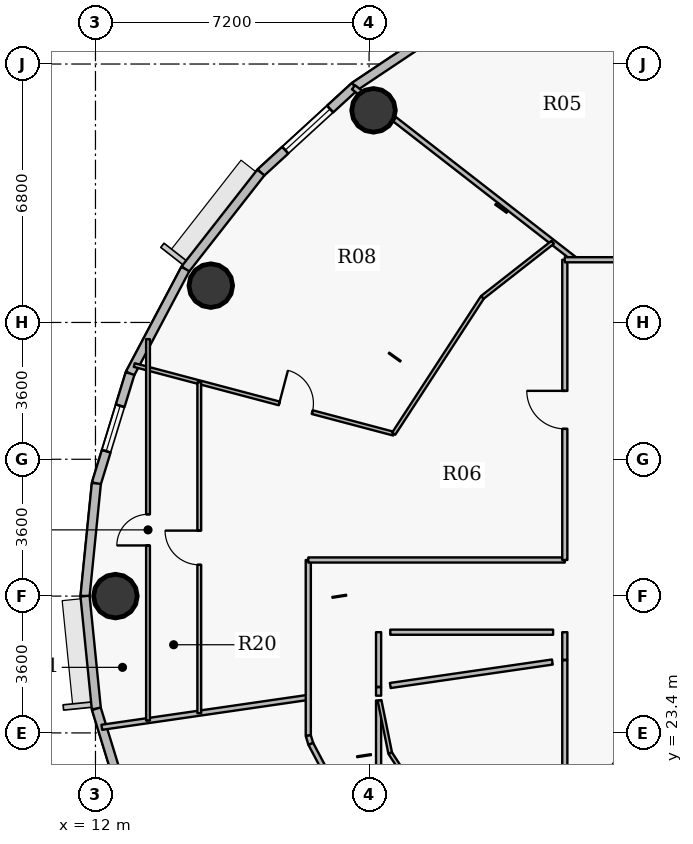
"""IFC4 building model, lengths in metres.
Left out: names, types, materials, properties, quantities, classifications, styles, units other than length and angle.
Written with IfcOpenShell. Run it as: python <this file> out.ifc"""

import sys

from ifc_helpers import new_model, si_unit, direction, frame, frame_2d, origin, origin_2d, place, context, subcontext, project, spatial, rectangle, hollow_circle, extrude, source, transform, mapped, element, fill, save


model = new_model("IFC4")
c1 = context("Model", 3, precision=1e-05, world=origin(), true_north=direction((0.0, 1.0)))
c2 = subcontext(c1, "Body", "Model", "MODEL_VIEW")
j1 = project(units=[si_unit("LENGTHUNIT", "METRE"), si_unit("PLANEANGLEUNIT", "RADIAN")], contexts=[c1])
p1 = place(None, origin())
s1 = spatial("IfcSite", under=j1, at=p1, CompositionType="ELEMENT")
p2 = place(p1, origin())
s2 = spatial("IfcBuilding", under=s1, at=p2, CompositionType="ELEMENT")
p3 = place(p2, frame((0.0, 0.0, 232.8)))
s3 = spatial("IfcBuildingStorey", under=s2, at=p3, CompositionType="ELEMENT", Elevation=232.8)
for number, where, z_axis, x_axis in (
    (1, (19.317, 39.781, 0.0), (0.0, 0.0, 1.0), (1.0, 0.0, 0.0)),
    (2, (15.035, 35.169, 0.0), (0.0, 0.0, 1.0), (1.0, 0.0, 0.0)),
    (3, (12.525, 27.0, 0.0), (0.0, 0.0, 1.0), (1.0, 0.0, 0.0)),
):
    element("IfcColumn", number, at=place(p3, frame(where, z_axis=z_axis, x_axis=x_axis)), inside=s3, PredefinedType="COLUMN", context=c2, shape_type="SweptSolid", body=[
        extrude(hollow_circle(Radius=0.575, WallThickness=0.036, at=origin_2d()), origin(), (0.0, 0.0, 1.0), 3.75),
    ])
p4 = place(p3, frame((18.824, 40.411, 0.0), z_axis=(0.0, 0.0, 1.0), x_axis=(0.831262496074, 0.555880079352, 0.0)))
e4 = element("IfcWall", 4, at=p4, inside=s3, PredefinedType="SOLIDWALL", context=c2, shape_type="SweptSolid", body=[
    extrude(rectangle(XDim=3.484, YDim=0.24, at=frame_2d((1.742, 0.0))), origin(), (0.0, 0.0, 1.0), 3.5),
])
p5 = place(p3, frame((16.352, 38.145, 0.0), z_axis=(0.0, 0.0, 1.0), x_axis=(0.737123922599, 0.675757591694, 0.0)))
e5 = element("IfcWall", 5, at=p5, inside=s3, PredefinedType="SOLIDWALL", context=c2, shape_type="SweptSolid", body=[
    extrude(rectangle(XDim=3.354, YDim=0.24, at=frame_2d((1.677, 0.0))), origin(), (0.0, 0.0, 1.0), 3.5),
])
p6 = place(p5, frame((0.873, 0.0, 0.9)))
e6 = element("IfcOpeningElement", 6, at=p6, cuts=e5, PredefinedType="OPENING", context=c2, shape_type="SweptSolid", body=[
    extrude(rectangle(XDim=1.6, YDim=1.75, at=origin_2d()), frame((0.8, 0.13, 0.875), z_axis=(0.0, -1.0, 0.0), x_axis=(1.0, 0.0, 0.0)), (0.0, 0.0, 1.0), 0.26),
])
p7 = place(p3, frame((14.364, 35.605, 0.0), z_axis=(0.0, 0.0, 1.0), x_axis=(0.616312344705, 0.787501805562, 0.0)))
e7 = element("IfcWall", 7, at=p7, inside=s3, PredefinedType="SOLIDWALL", context=c2, shape_type="SweptSolid", body=[
    extrude(rectangle(XDim=3.225, YDim=0.24, at=frame_2d((1.612, 0.0))), origin(), (0.0, 0.0, 1.0), 3.5),
])
p8 = place(p3, frame((12.91, 32.856, 0.0), z_axis=(0.0, 0.0, 1.0), x_axis=(0.46766049993, 0.883908172157, 0.0)))
e8 = element("IfcWall", 8, at=p8, inside=s3, PredefinedType="SOLIDWALL", context=c2, shape_type="SweptSolid", body=[
    extrude(rectangle(XDim=3.11, YDim=0.24, at=frame_2d((1.555, 0.0))), origin(), (0.0, 0.0, 1.0), 3.5),
])
p9 = place(p3, frame((12.023, 29.964, 0.0), z_axis=(0.0, 0.0, 1.0), x_axis=(0.293132907334, 0.95607170162, 0.0)))
e9 = element("IfcWall", 9, at=p9, inside=s3, PredefinedType="SOLIDWALL", context=c2, shape_type="SweptSolid", body=[
    extrude(rectangle(XDim=3.025, YDim=0.24, at=frame_2d((1.512, 0.0))), origin(), (0.0, 0.0, 1.0), 3.5),
])
p10 = place(p9, frame((0.887, 0.0, 0.9)))
e10 = element("IfcOpeningElement", 10, at=p10, cuts=e9, PredefinedType="OPENING", context=c2, shape_type="SweptSolid", body=[
    extrude(rectangle(XDim=1.25, YDim=1.65, at=origin_2d()), frame((0.625, 0.13, 0.825), z_axis=(0.0, -1.0, 0.0), x_axis=(1.0, 0.0, 0.0)), (0.0, 0.0, 1.0), 0.26),
])
for number, where, z_axis, x_axis in (
    (11, (11.725, 27.0, 0.0), (0.0, 0.0, 1.0), (0.1, 0.995, 0.0)),
    (12, (12.023, 24.036, 0.0), (0.0, 0.0, 1.0), (-0.1, 0.995, 0.0)),
):
    element("IfcWall", number, at=place(p3, frame(where, z_axis=z_axis, x_axis=x_axis)), inside=s3, PredefinedType="SOLIDWALL", context=c2, shape_type="SweptSolid", body=[
        extrude(rectangle(XDim=2.979, YDim=0.24, at=frame_2d((1.489, 0.0))), origin(), (0.0, 0.0, 1.0), 3.5),
    ])
p11 = place(p3, frame((12.91, 21.144, 0.0), z_axis=(0.0, 0.0, 1.0), x_axis=(-0.293132907334, 0.95607170162, 0.0)))
e13 = element("IfcWall", 13, at=p11, inside=s3, PredefinedType="SOLIDWALL", context=c2, shape_type="SweptSolid", body=[
    extrude(rectangle(XDim=3.025, YDim=0.24, at=frame_2d((1.512, 0.0))), origin(), (0.0, 0.0, 1.0), 3.5),
])
p12 = place(p3, frame((12.167, 23.548, 0.0), z_axis=(0.0, 0.0, 1.0), x_axis=(0.989672764262, 0.143345106921, 0.0)))
e14 = element("IfcWall", 14, at=p12, inside=s3, PredefinedType="PARTITIONING", context=c2, shape_type="SweptSolid", body=[
    extrude(rectangle(XDim=5.489, YDim=0.135, at=frame_2d((2.745, 0.0))), origin(), (0.0, 0.0, 1.0), 2.985),
])
p13 = place(p3, frame((13.022, 33.079, 0.0), z_axis=(0.0, 0.0, 1.0), x_axis=(0.966904841433, -0.255137272097, 0.0)))
e15 = element("IfcWall", 15, at=p13, inside=s3, PredefinedType="PARTITIONING", context=c2, shape_type="SweptSolid", body=[
    extrude(rectangle(XDim=0.373, YDim=0.1, at=frame_2d((0.187, 0.0))), origin(), (0.0, 0.0, 1.0), 3.5),
])
p14 = place(p3, frame((13.392, 32.981, 0.0), z_axis=(0.0, 0.0, 1.0), x_axis=(0.966739802164, -0.255761910595, 0.0)))
e16 = element("IfcWall", 16, at=p14, inside=s3, PredefinedType="PARTITIONING", context=c2, shape_type="SweptSolid", body=[
    extrude(rectangle(XDim=6.677, YDim=0.1, at=frame_2d((3.339, 0.0))), origin(), (0.0, 0.0, 1.0), 2.985),
])
p15 = place(p14, frame((3.561, 0.0, 0.0)))
e17 = element("IfcOpeningElement", 17, at=p15, cuts=e16, PredefinedType="OPENING", context=c2, shape_type="SweptSolid", body=[
    extrude(rectangle(XDim=0.9, YDim=2.1, at=origin_2d()), frame((0.45, 0.06, 1.05), z_axis=(0.0, -1.0, 0.0), x_axis=(1.0, 0.0, 0.0)), (0.0, 0.0, 1.0), 0.12),
])
p16 = place(p3, frame((13.383, 23.724, 0.0), z_axis=(0.0, 0.0, 1.0), x_axis=(0.0, 1.0, 0.0)))
e18 = element("IfcWall", 18, at=p16, inside=s3, PredefinedType="PARTITIONING", context=c2, shape_type="SweptSolid", body=[
    extrude(rectangle(XDim=10.037, YDim=0.1, at=frame_2d((5.019, 0.0))), origin(), (0.0, 0.0, 1.0), 2.935),
])
p17 = place(p16, frame((4.608, 0.0, 0.0)))
e19 = element("IfcOpeningElement", 19, at=p17, cuts=e18, PredefinedType="OPENING", context=c2, shape_type="SweptSolid", body=[
    extrude(rectangle(XDim=0.82, YDim=2.1, at=origin_2d()), frame((0.41, 0.06, 1.05), z_axis=(0.0, -1.0, 0.0), x_axis=(1.0, 0.0, 0.0)), (0.0, 0.0, 1.0), 0.12),
])
p18 = place(p3, frame((14.732, 23.919, 0.0), z_axis=(0.0, 0.0, 1.0), x_axis=(0.0, 1.0, 0.0)))
e20 = element("IfcWall", 20, at=p18, inside=s3, PredefinedType="PARTITIONING", context=c2, shape_type="SweptSolid", body=[
    extrude(rectangle(XDim=8.708, YDim=0.1, at=frame_2d((4.354, 0.0))), origin(), (0.0, 0.0, 1.0), 2.935),
])
p19 = place(p18, frame((3.904, 0.0, 0.0)))
e21 = element("IfcOpeningElement", 21, at=p19, cuts=e20, PredefinedType="OPENING", context=c2, shape_type="SweptSolid", body=[
    extrude(rectangle(XDim=0.9, YDim=2.1, at=origin_2d()), frame((0.45, 0.06, 1.05), z_axis=(0.0, -1.0, 0.0), x_axis=(1.0, 0.0, 0.0)), (0.0, 0.0, 1.0), 0.12),
])
p20 = place(p3, frame((17.6, 23.328, 0.0), z_axis=(0.0, 0.0, 1.0), x_axis=(0.0, 1.0, 0.0)))
e22 = element("IfcWall", 22, at=p20, inside=s3, PredefinedType="PARTITIONING", context=c2, shape_type="SweptSolid", body=[
    extrude(rectangle(XDim=4.622, YDim=0.135, at=frame_2d((2.311, 0.0))), origin(), (0.0, 0.0, 1.0), 2.935),
])
p21 = place(p3, frame((17.6, 23.328, 0.0), z_axis=(0.0, 0.0, 1.0), x_axis=(0.292875000845, -0.956150738053, 0.0)))
e23 = element("IfcWall", 23, at=p21, inside=s3, PredefinedType="PARTITIONING", context=c2, shape_type="SweptSolid", body=[
    extrude(rectangle(XDim=0.227, YDim=0.135, at=frame_2d((0.113, 0.0))), origin(), (0.0, 0.0, 1.0), 3.5),
])
p22 = place(p3, frame((17.6, 27.95, 0.0), z_axis=(0.0, 0.0, 1.0), x_axis=(1.0, 0.0, 0.0)))
e24 = element("IfcWall", 24, at=p22, inside=s3, PredefinedType="PARTITIONING", context=c2, shape_type="SweptSolid", body=[
    extrude(rectangle(XDim=6.75, YDim=0.135, at=frame_2d((3.375, 0.0))), origin(), (0.0, 0.0, 1.0), 3.5),
])
p23 = place(p3, frame((17.667, 23.111, 0.0), z_axis=(0.0, 0.0, 1.0), x_axis=(0.467675622269, -0.883900171024, 0.0)))
e25 = element("IfcWall", 25, at=p23, inside=s3, PredefinedType="PARTITIONING", context=c2, shape_type="SweptSolid", body=[
    extrude(rectangle(XDim=2.168, YDim=0.135, at=frame_2d((1.084, 0.0))), origin(), (0.0, 0.0, 1.0), 2.935),
])
p24 = place(p3, frame((18.791, 40.387, 0.0), z_axis=(0.0, 0.0, 1.0), x_axis=(0.789302404173, -0.614004653701, 0.0)))
e26 = element("IfcWall", 26, at=p24, inside=s3, PredefinedType="PARTITIONING", context=c2, shape_type="SweptSolid", body=[
    extrude(rectangle(XDim=7.39, YDim=0.135, at=frame_2d((3.695, 0.0))), origin(), (0.0, 0.0, 1.0), 2.935),
])
p25 = place(p3, frame((19.45, 20.211, 0.0), z_axis=(0.0, 0.0, 1.0), x_axis=(0.0, 1.0, 0.0)))
e27 = element("IfcWall", 27, at=p25, inside=s3, PredefinedType="PARTITIONING", context=c2, shape_type="SweptSolid", body=[
    extrude(rectangle(XDim=4.042, YDim=0.135, at=frame_2d((2.021, 0.0))), origin(), (0.0, 0.0, 1.0), 2.935),
])
p26 = place(p3, frame((19.45, 24.38, 0.0), z_axis=(0.0, 0.0, 1.0), x_axis=(0.0, 1.0, 0.0)))
e28 = element("IfcWall", 28, at=p26, inside=s3, PredefinedType="PARTITIONING", context=c2, shape_type="SweptSolid", body=[
    extrude(rectangle(XDim=0.223, YDim=0.135, at=frame_2d((0.111, 0.0))), origin(), (0.0, 0.0, 1.0), 3.5),
])
p27 = place(p3, frame((19.475, 24.256, 0.0), z_axis=(0.0, 0.0, 1.0), x_axis=(0.198203790622, -0.980160832406, 0.0)))
e29 = element("IfcWall", 29, at=p27, inside=s3, PredefinedType="PARTITIONING", context=c2, shape_type="SweptSolid", body=[
    extrude(rectangle(XDim=1.417, YDim=0.1, at=frame_2d((0.708, 0.0))), origin(), (0.0, 0.0, 1.0), 2.935),
])
p28 = place(p3, frame((19.756, 22.867, 0.0), z_axis=(0.0, 0.0, 1.0), x_axis=(0.545441385955, -0.83814896915, 0.0)))
e30 = element("IfcWall", 30, at=p28, inside=s3, PredefinedType="PARTITIONING", context=c2, shape_type="SweptSolid", body=[
    extrude(rectangle(XDim=4.318, YDim=0.1, at=frame_2d((2.159, 0.0))), origin(), (0.0, 0.0, 1.0), 2.935),
])
p29 = place(p3, frame((19.847, 31.273, 0.0), z_axis=(0.0, 0.0, 1.0), x_axis=(0.545399280946, 0.83817636828, 0.0)))
e31 = element("IfcWall", 31, at=p29, inside=s3, PredefinedType="PARTITIONING", context=c2, shape_type="SweptSolid", body=[
    extrude(rectangle(XDim=4.28, YDim=0.1, at=frame_2d((2.14, 0.0))), origin(), (0.0, 0.0, 1.0), 2.935),
])
p30 = place(p3, frame((22.182, 34.861, 0.0), z_axis=(0.0, 0.0, 1.0), x_axis=(0.78737344739, 0.616476320994, 0.0)))
e32 = element("IfcWall", 32, at=p30, inside=s3, PredefinedType="PARTITIONING", context=c2, shape_type="SweptSolid", body=[
    extrude(rectangle(XDim=2.35, YDim=0.1, at=frame_2d((1.175, 0.0))), origin(), (0.0, 0.0, 1.0), 2.935),
])
p31 = place(p3, frame((24.35, 18.15, 0.0), z_axis=(0.0, 0.0, 1.0), x_axis=(0.0, 1.0, 0.0)))
e33 = element("IfcWall", 33, at=p31, inside=s3, PredefinedType="PARTITIONING", context=c2, shape_type="SweptSolid", body=[
    extrude(rectangle(XDim=7.163, YDim=0.135, at=frame_2d((3.581, 0.0))), origin(), (0.0, 0.0, 1.0), 2.935),
])
p32 = place(p31, frame((3.081, 0.0, 0.0)))
e34 = element("IfcOpeningElement", 34, at=p32, cuts=e33, PredefinedType="OPENING", context=c2, shape_type="SweptSolid", body=[
    extrude(rectangle(XDim=1.0, YDim=2.15, at=origin_2d()), frame((0.5, 0.078, 1.075), z_axis=(0.0, -1.0, 0.0), x_axis=(1.0, 0.0, 0.0)), (0.0, 0.0, 1.0), 0.155),
])
p33 = place(p3, frame((24.35, 27.95, 0.0), z_axis=(0.0, 0.0, 1.0), x_axis=(0.0, 1.0, 0.0)))
e35 = element("IfcWall", 35, at=p33, inside=s3, PredefinedType="PARTITIONING", context=c2, shape_type="SweptSolid", body=[
    extrude(rectangle(XDim=7.9, YDim=0.135, at=frame_2d((3.95, 0.0))), origin(), (0.0, 0.0, 1.0), 2.935),
])
p34 = place(p33, frame((3.45, 0.0, 0.0)))
e36 = element("IfcOpeningElement", 36, at=p34, cuts=e35, PredefinedType="OPENING", context=c2, shape_type="SweptSolid", body=[
    extrude(rectangle(XDim=1.0, YDim=2.15, at=origin_2d()), frame((0.5, 0.078, 1.075), z_axis=(0.0, -1.0, 0.0), x_axis=(1.0, 0.0, 0.0)), (0.0, 0.0, 1.0), 0.155),
])
p35 = place(p3, frame((24.35, 35.85, 0.0), z_axis=(0.0, 0.0, 1.0), x_axis=(1.0, 0.0, 0.0)))
e37 = element("IfcWall", 37, at=p35, inside=s3, PredefinedType="PARTITIONING", context=c2, shape_type="SweptSolid", body=[
    extrude(rectangle(XDim=26.218, YDim=0.135, at=frame_2d((13.109, 0.0))), origin(), (0.0, 0.0, 1.0), 2.935),
])
p36 = place(p35, frame((3.172, 0.0, 0.0)))
e38 = element("IfcOpeningElement", 38, at=p36, cuts=e37, PredefinedType="OPENING", context=c2, shape_type="SweptSolid", body=[
    extrude(rectangle(XDim=1.0, YDim=2.15, at=origin_2d()), frame((0.5, 0.078, 1.075), z_axis=(0.0, -1.0, 0.0), x_axis=(1.0, 0.0, 0.0)), (0.0, 0.0, 1.0), 0.155),
])
p37 = place(p35, frame((18.306, 0.0, 0.0)))
e39 = element("IfcOpeningElement", 39, at=p37, cuts=e37, PredefinedType="OPENING", context=c2, shape_type="SweptSolid", body=[
    extrude(rectangle(XDim=1.0, YDim=2.15, at=origin_2d()), frame((0.5, 0.078, 1.075), z_axis=(0.0, -1.0, 0.0), x_axis=(1.0, 0.0, 0.0)), (0.0, 0.0, 1.0), 0.155),
])
p38 = place(p3, frame((19.45, 26.05, 0.0), z_axis=(0.0, 0.0, 1.0), x_axis=(0.0, -1.0, 0.0)))
e40 = element("IfcWall", 40, at=p38, inside=s3, PredefinedType="PARTITIONING", context=c2, shape_type="SweptSolid", body=[
    extrude(rectangle(XDim=1.437, YDim=0.135, at=frame_2d((0.719, 0.0))), origin(), (0.0, 0.0, 1.0), 3.5),
])
p39 = place(p3, frame((24.35, 25.323, 0.0), z_axis=(0.0, 0.0, 1.0), x_axis=(0.0, 1.0, 0.0)))
e41 = element("IfcWall", 41, at=p39, inside=s3, PredefinedType="PARTITIONING", context=c2, shape_type="SweptSolid", body=[
    extrude(rectangle(XDim=0.728, YDim=0.135, at=frame_2d((0.364, 0.0))), origin(), (0.0, 0.0, 1.0), 3.5),
])
p40 = place(p3, frame((24.042, 26.05, 0.0), z_axis=(0.0, 0.0, 1.0), x_axis=(-1.0, 0.0, 0.0)))
e42 = element("IfcWall", 42, at=p40, inside=s3, PredefinedType="PARTITIONING", context=c2, shape_type="SweptSolid", body=[
    extrude(rectangle(XDim=4.285, YDim=0.135, at=frame_2d((2.143, 0.0))), origin(), (0.0, 0.0, 1.0), 3.5),
])
p41 = place(p3, frame((19.758, 24.647, 0.0), z_axis=(0.0, 0.0, 1.0), x_axis=(0.989666541967, 0.143388059861, 0.0)))
e43 = element("IfcWall", 43, at=p41, inside=s3, PredefinedType="PARTITIONING", context=c2, shape_type="SweptSolid", body=[
    extrude(rectangle(XDim=4.309, YDim=0.135, at=frame_2d((2.155, 0.0))), origin(), (0.0, 0.0, 1.0), 3.5),
])
m1 = source(origin(), c2, "Body", "SweptSolid", [
    extrude(rectangle(XDim=1.6, YDim=1.75, at=origin_2d()), frame((0.8, 0.03, 0.875), z_axis=(0.0, -1.0, 0.0), x_axis=(1.0, 0.0, 0.0)), (0.0, 0.0, 1.0), 0.06),
])
p42 = place(p6, origin())
e44 = element("IfcWindow", 44, at=p42, inside=s3, PartitioningType="DOUBLE_PANEL_VERTICAL", PredefinedType="WINDOW", context=c2, shape_type="MappedRepresentation", body=[
    mapped(m1, transform((0.0, 0.0, 0.0), x_axis=(1.0, 0.0, 0.0), y_axis=(0.0, 1.0, 0.0), z_axis=(0.0, 0.0, 1.0), scale=1.0)),
])
fill(e6, e44)
m2 = source(origin(), c2, "Body", "SweptSolid", [
    extrude(rectangle(XDim=1.25, YDim=1.65, at=origin_2d()), frame((0.625, 0.03, 0.825), z_axis=(0.0, -1.0, 0.0), x_axis=(1.0, 0.0, 0.0)), (0.0, 0.0, 1.0), 0.06),
])
p43 = place(p10, origin())
e45 = element("IfcWindow", 45, at=p43, inside=s3, PartitioningType="SINGLE_PANEL", PredefinedType="WINDOW", context=c2, shape_type="MappedRepresentation", body=[
    mapped(m2, transform((0.0, 0.0, 0.0), x_axis=(1.0, 0.0, 0.0), y_axis=(0.0, 1.0, 0.0), z_axis=(0.0, 0.0, 1.0), scale=1.0)),
])
fill(e10, e45)
m3 = source(origin(), c2, "Body", "SweptSolid", [
    extrude(rectangle(XDim=1.0, YDim=2.15, at=origin_2d()), frame((0.5, 0.025, 1.075), z_axis=(0.0, -1.0, 0.0), x_axis=(1.0, 0.0, 0.0)), (0.0, 0.0, 1.0), 0.05),
])
p44 = place(p34, origin())
e46 = element("IfcDoor", 46, at=p44, inside=s3, OperationType="SINGLE_SWING_RIGHT", PredefinedType="DOOR", context=c2, shape_type="MappedRepresentation", body=[
    mapped(m3, transform((0.0, 0.0, 0.0), x_axis=(1.0, 0.0, 0.0), y_axis=(0.0, 1.0, 0.0), z_axis=(0.0, 0.0, 1.0), scale=1.0)),
])
fill(e36, e46)
m4 = source(origin(), c2, "Body", "SweptSolid", [
    extrude(rectangle(XDim=0.9, YDim=2.1, at=origin_2d()), frame((0.45, 0.025, 1.05), z_axis=(0.0, -1.0, 0.0), x_axis=(1.0, 0.0, 0.0)), (0.0, 0.0, 1.0), 0.05),
])
p45 = place(p15, origin())
e47 = element("IfcDoor", 47, at=p45, inside=s3, OperationType="SINGLE_SWING_LEFT", PredefinedType="DOOR", context=c2, shape_type="MappedRepresentation", body=[
    mapped(m4, transform((0.0, 0.0, 0.0), x_axis=(1.0, 0.0, 0.0), y_axis=(0.0, 1.0, 0.0), z_axis=(0.0, 0.0, 1.0), scale=1.0)),
])
fill(e17, e47)
p46 = place(p19, origin())
e48 = element("IfcDoor", 48, at=p46, inside=s3, OperationType="SINGLE_SWING_RIGHT", PredefinedType="DOOR", context=c2, shape_type="MappedRepresentation", body=[
    mapped(m4, transform((0.0, 0.0, 0.0), x_axis=(1.0, 0.0, 0.0), y_axis=(0.0, 1.0, 0.0), z_axis=(0.0, 0.0, 1.0), scale=1.0)),
])
fill(e21, e48)
m5 = source(origin(), c2, "Body", "SweptSolid", [
    extrude(rectangle(XDim=0.82, YDim=2.1, at=origin_2d()), frame((0.41, 0.025, 1.05), z_axis=(0.0, -1.0, 0.0), x_axis=(1.0, 0.0, 0.0)), (0.0, 0.0, 1.0), 0.05),
])
p47 = place(p17, origin())
e49 = element("IfcDoor", 49, at=p47, inside=s3, OperationType="SINGLE_SWING_LEFT", PredefinedType="DOOR", context=c2, shape_type="MappedRepresentation", body=[
    mapped(m5, transform((0.0, 0.0, 0.0), x_axis=(1.0, 0.0, 0.0), y_axis=(0.0, 1.0, 0.0), z_axis=(0.0, 0.0, 1.0), scale=1.0)),
])
fill(e19, e49)
save(model, sys.argv[1])
